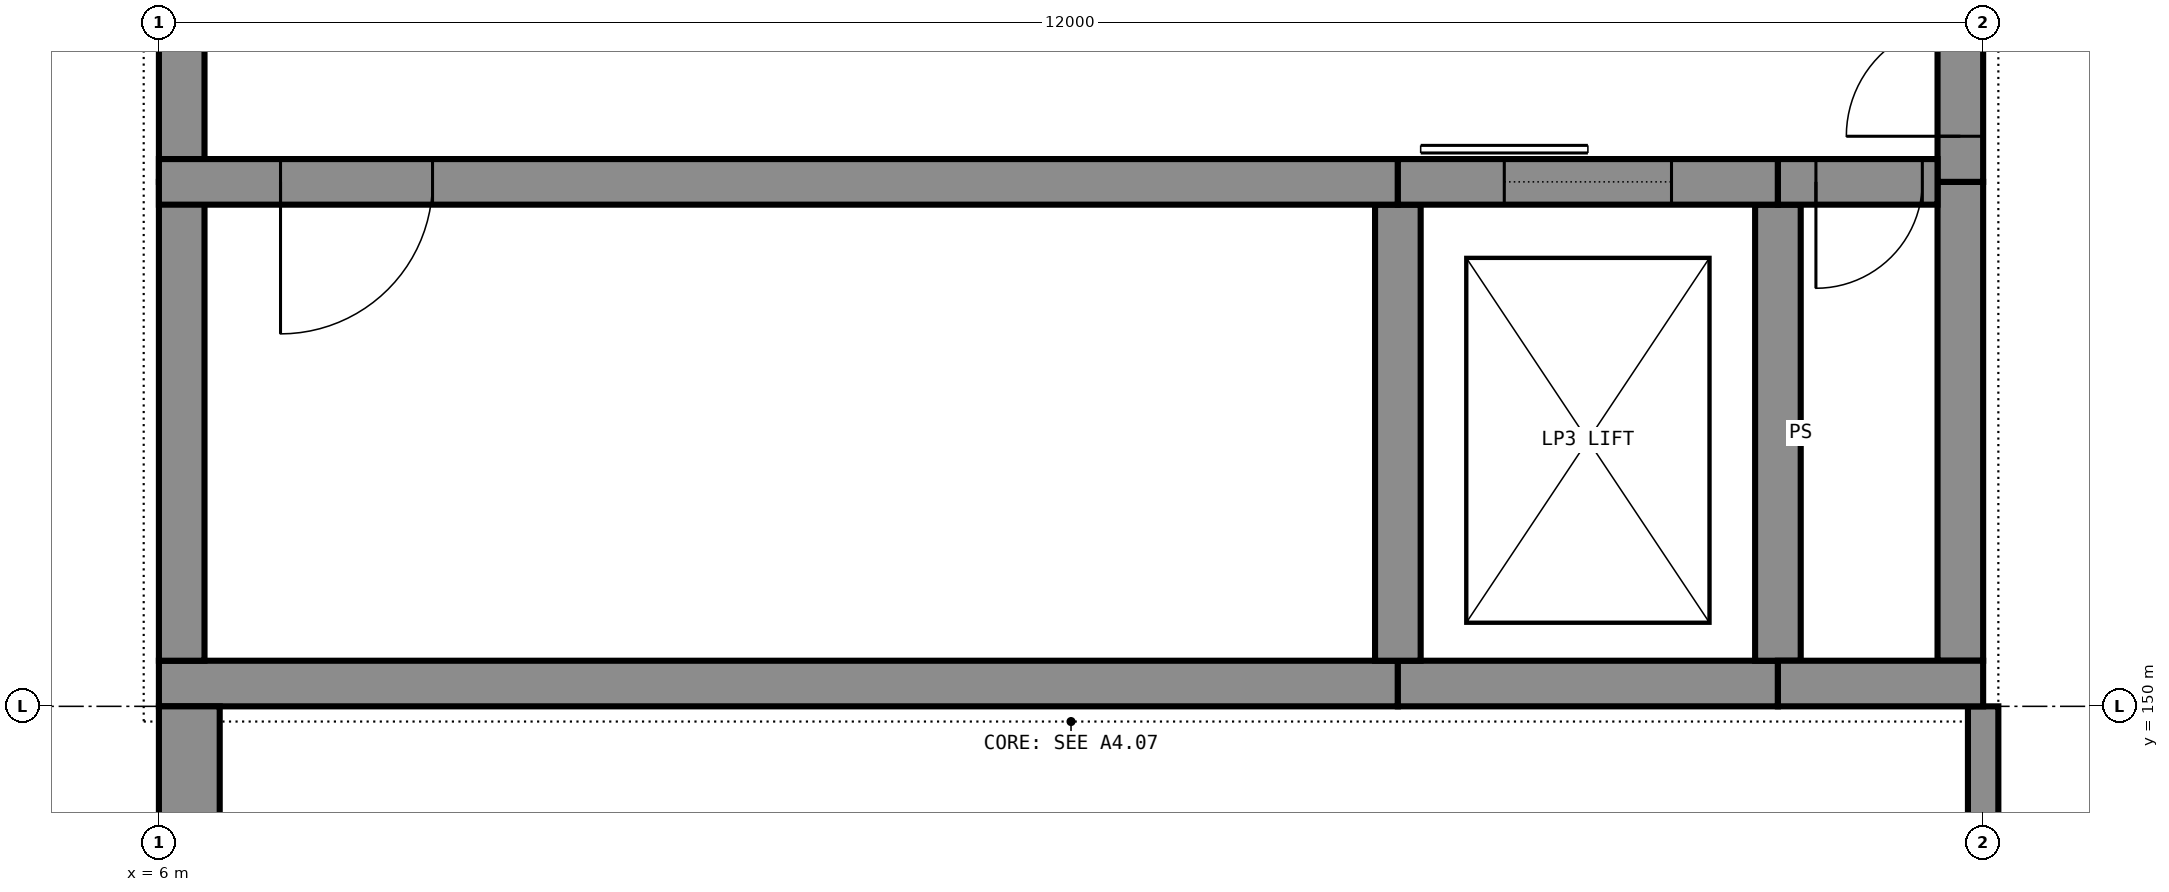
"""IFC4 building model, lengths in metres.
Left out: names, types, materials, properties, quantities, classifications, styles, units other than length and angle.
Written with IfcOpenShell. Run it as: python <this file> out.ifc"""

import sys

from ifc_helpers import new_model, si_unit, direction, frame, frame_2d, origin, place, context, subcontext, project, spatial, rectangle, extrude, element, fill, save


model = new_model("IFC4")
c1 = context("Model", 3, precision=1e-05, world=origin(), true_north=direction((0.0, 1.0)))
c2 = subcontext(c1, "Body", "Model", "MODEL_VIEW")
j1 = project(units=[si_unit("LENGTHUNIT", "METRE"), si_unit("PLANEANGLEUNIT", "RADIAN")], contexts=[c1])
p1 = place(None, origin())
s1 = spatial("IfcSite", under=j1, at=p1, CompositionType="ELEMENT")
p2 = place(p1, origin())
s2 = spatial("IfcBuilding", under=s1, at=p2, CompositionType="ELEMENT")
p3 = place(p2, frame((0.0, 0.0, -6.0)))
s3 = spatial("IfcBuildingStorey", under=s2, at=p3, CompositionType="ELEMENT", Elevation=-6.0)
p4 = place(p3, frame((6.0, 150.15, 0.0), z_axis=(0.0, 0.0, 1.0), x_axis=(1.0, 0.0, 0.0)))
e1 = element("IfcWall", 1, at=p4, inside=s3, PredefinedType="SHEAR", context=c2, shape_type="SweptSolid", body=[
    extrude(rectangle(XDim=8.15, YDim=0.3, at=frame_2d((4.075, 0.0))), origin(), (0.0, 0.0, 1.0), 5.7),
])
p5 = place(p3, frame((14.15, 150.15, 0.0), z_axis=(0.0, 0.0, 1.0), x_axis=(1.0, 0.0, 0.0)))
e2 = element("IfcWall", 2, at=p5, inside=s3, PredefinedType="SHEAR", context=c2, shape_type="SweptSolid", body=[
    extrude(rectangle(XDim=2.5, YDim=0.3, at=frame_2d((1.25, 0.0))), origin(), (0.0, 0.0, 1.0), 5.7),
])
p6 = place(p3, frame((16.65, 150.15, 0.0), z_axis=(0.0, 0.0, 1.0), x_axis=(1.0, 0.0, 0.0)))
e3 = element("IfcWall", 3, at=p6, inside=s3, PredefinedType="SHEAR", context=c2, shape_type="SweptSolid", body=[
    extrude(rectangle(XDim=1.35, YDim=0.3, at=frame_2d((0.675, 0.0))), origin(), (0.0, 0.0, 1.0), 5.7),
])
p7 = place(p3, frame((6.0, 153.45, 0.0), z_axis=(0.0, 0.0, 1.0), x_axis=(1.0, 0.0, 0.0)))
e4 = element("IfcWall", 4, at=p7, inside=s3, PredefinedType="SHEAR", context=c2, shape_type="SweptSolid", body=[
    extrude(rectangle(XDim=8.15, YDim=0.3, at=frame_2d((4.075, 0.0))), origin(), (0.0, 0.0, 1.0), 5.7),
])
p8 = place(p7, frame((0.8, 0.0, 0.0)))
e5 = element("IfcOpeningElement", 5, at=p8, cuts=e4, PredefinedType="OPENING", context=c2, shape_type="SweptSolid", body=[
    extrude(rectangle(XDim=1.0, YDim=2.1, at=frame_2d((0.5, 1.05))), frame((0.0, 0.16, 0.0), z_axis=(0.0, -1.0, 0.0), x_axis=(1.0, 0.0, 0.0)), (0.0, 0.0, 1.0), 0.32),
])
p9 = place(p3, frame((14.15, 153.45, 0.0), z_axis=(0.0, 0.0, 1.0), x_axis=(1.0, 0.0, 0.0)))
e6 = element("IfcWall", 6, at=p9, inside=s3, PredefinedType="SHEAR", context=c2, shape_type="SweptSolid", body=[
    extrude(rectangle(XDim=2.5, YDim=0.3, at=frame_2d((1.25, 0.0))), origin(), (0.0, 0.0, 1.0), 5.7),
])
p10 = place(p9, frame((0.7, 0.0, 0.0)))
e7 = element("IfcOpeningElement", 7, at=p10, cuts=e6, PredefinedType="OPENING", context=c2, shape_type="SweptSolid", body=[
    extrude(rectangle(XDim=1.1, YDim=2.1, at=frame_2d((0.55, 1.05))), frame((0.0, 0.16, 0.0), z_axis=(0.0, -1.0, 0.0), x_axis=(1.0, 0.0, 0.0)), (0.0, 0.0, 1.0), 0.32),
])
p11 = place(p3, frame((16.65, 153.45, 0.0), z_axis=(0.0, 0.0, 1.0), x_axis=(1.0, 0.0, 0.0)))
e8 = element("IfcWall", 8, at=p11, inside=s3, PredefinedType="SHEAR", context=c2, shape_type="SweptSolid", body=[
    extrude(rectangle(XDim=1.05, YDim=0.3, at=frame_2d((0.525, 0.0))), origin(), (0.0, 0.0, 1.0), 5.7),
])
p12 = place(p11, frame((0.25, 0.0, 0.0)))
e9 = element("IfcOpeningElement", 9, at=p12, cuts=e8, PredefinedType="OPENING", context=c2, shape_type="SweptSolid", body=[
    extrude(rectangle(XDim=0.7, YDim=2.1, at=frame_2d((0.35, 1.05))), frame((0.0, 0.16, 0.0), z_axis=(0.0, -1.0, 0.0), x_axis=(1.0, 0.0, 0.0)), (0.0, 0.0, 1.0), 0.32),
])
p13 = place(p3, frame((6.15, 150.3, 0.0), z_axis=(0.0, 0.0, 1.0), x_axis=(0.0, 1.0, 0.0)))
e10 = element("IfcWall", 10, at=p13, inside=s3, PredefinedType="SHEAR", context=c2, shape_type="SweptSolid", body=[
    extrude(rectangle(XDim=3.15, YDim=0.3, at=frame_2d((1.575, 0.0))), origin(), (0.0, 0.0, 1.0), 5.7),
])
p14 = place(p3, frame((6.15, 153.45, 0.0), z_axis=(0.0, 0.0, 1.0), x_axis=(0.0, 1.0, 0.0)))
e11 = element("IfcWall", 11, at=p14, inside=s3, PredefinedType="SHEAR", context=c2, shape_type="SweptSolid", body=[
    extrude(rectangle(XDim=5.1, YDim=0.3, at=frame_2d((2.55, 0.0))), origin(), (0.0, 0.0, 1.0), 5.7),
])
p15 = place(p3, frame((17.85, 150.3, 0.0), z_axis=(0.0, 0.0, 1.0), x_axis=(0.0, 1.0, 0.0)))
e12 = element("IfcWall", 12, at=p15, inside=s3, PredefinedType="SHEAR", context=c2, shape_type="SweptSolid", body=[
    extrude(rectangle(XDim=3.15, YDim=0.3, at=frame_2d((1.575, 0.0))), origin(), (0.0, 0.0, 1.0), 5.7),
])
p16 = place(p3, frame((17.85, 153.45, 0.0), z_axis=(0.0, 0.0, 1.0), x_axis=(0.0, 1.0, 0.0)))
e13 = element("IfcWall", 13, at=p16, inside=s3, PredefinedType="SHEAR", context=c2, shape_type="SweptSolid", body=[
    extrude(rectangle(XDim=5.1, YDim=0.3, at=frame_2d((2.55, 0.0))), origin(), (0.0, 0.0, 1.0), 5.7),
])
p17 = place(p16, frame((0.3, 0.0, 0.0)))
e14 = element("IfcOpeningElement", 14, at=p17, cuts=e13, PredefinedType="OPENING", context=c2, shape_type="SweptSolid", body=[
    extrude(rectangle(XDim=1.5, YDim=2.1, at=frame_2d((0.75, 1.05))), frame((0.0, 0.16, 0.0), z_axis=(0.0, -1.0, 0.0), x_axis=(1.0, 0.0, 0.0)), (0.0, 0.0, 1.0), 0.32),
])
for number, where, z_axis, x_axis in (
    (15, (14.15, 150.3, 0.0), (0.0, 0.0, 1.0), (0.0, 1.0, 0.0)),
    (16, (16.65, 150.3, 0.0), (0.0, 0.0, 1.0), (0.0, 1.0, 0.0)),
):
    element("IfcWall", number, at=place(p3, frame(where, z_axis=z_axis, x_axis=x_axis)), inside=s3, PredefinedType="SHEAR", context=c2, shape_type="SweptSolid", body=[
        extrude(rectangle(XDim=3.0, YDim=0.3, at=frame_2d((1.5, 0.0))), origin(), (0.0, 0.0, 1.0), 5.7),
    ])
p18 = place(p3, frame((6.2, 138.5, 0.0), z_axis=(0.0, 0.0, 1.0), x_axis=(0.0, 1.0, 0.0)))
e17 = element("IfcWall", 17, at=p18, inside=s3, PredefinedType="SOLIDWALL", context=c2, shape_type="SweptSolid", body=[
    extrude(rectangle(XDim=11.5, YDim=0.4, at=frame_2d((5.75, 0.0))), origin(), (0.0, 0.0, 1.0), 5.7),
])
p19 = place(p3, frame((18.0, 108.1, 0.0), z_axis=(0.0, 0.0, 1.0), x_axis=(0.0, 1.0, 0.0)))
e18 = element("IfcWall", 18, at=p19, inside=s3, PredefinedType="PARTITIONING", context=c2, shape_type="SweptSolid", body=[
    extrude(rectangle(XDim=41.9, YDim=0.2, at=frame_2d((20.95, 0.0))), origin(), (0.0, 0.0, 1.0), 4.7),
])
p20 = place(p19, frame((2.3, 0.0, 0.0)))
e19 = element("IfcOpeningElement", 19, at=p20, cuts=e18, PredefinedType="OPENING", context=c2, shape_type="SweptSolid", body=[
    extrude(rectangle(XDim=1.2, YDim=2.1, at=frame_2d((0.6, 1.05))), frame((0.0, 0.11, 0.0), z_axis=(0.0, -1.0, 0.0), x_axis=(1.0, 0.0, 0.0)), (0.0, 0.0, 1.0), 0.22),
])
p21 = place(p19, frame((14.3, 0.0, 0.0)))
e20 = element("IfcOpeningElement", 20, at=p21, cuts=e18, PredefinedType="OPENING", context=c2, shape_type="SweptSolid", body=[
    extrude(rectangle(XDim=1.2, YDim=2.1, at=frame_2d((0.6, 1.05))), frame((0.0, 0.11, 0.0), z_axis=(0.0, -1.0, 0.0), x_axis=(1.0, 0.0, 0.0)), (0.0, 0.0, 1.0), 0.22),
])
p22 = place(p19, frame((32.3, 0.0, 0.0)))
e21 = element("IfcOpeningElement", 21, at=p22, cuts=e18, PredefinedType="OPENING", context=c2, shape_type="SweptSolid", body=[
    extrude(rectangle(XDim=1.2, YDim=2.1, at=frame_2d((0.6, 1.05))), frame((0.0, 0.11, 0.0), z_axis=(0.0, -1.0, 0.0), x_axis=(1.0, 0.0, 0.0)), (0.0, 0.0, 1.0), 0.22),
])
p23 = place(p8, frame((1.0, 0.0, 0.0), z_axis=(0.0, 0.0, 1.0), x_axis=(-1.0, 0.0, 0.0)))
e22 = element("IfcDoor", 22, at=p23, inside=s3, OperationType="SINGLE_SWING_LEFT", PredefinedType="DOOR", context=c2, shape_type="SweptSolid", body=[
    extrude(rectangle(XDim=1.0, YDim=2.1, at=frame_2d((0.5, 1.05))), frame((0.0, 0.025, 0.0), z_axis=(0.0, -1.0, 0.0), x_axis=(1.0, 0.0, 0.0)), (0.0, 0.0, 1.0), 0.05),
])
fill(e5, e22)
p24 = place(p10, origin())
e23 = element("IfcDoor", 23, at=p24, inside=s3, OperationType="SLIDING_TO_LEFT", PredefinedType="DOOR", context=c2, shape_type="SweptSolid", body=[
    extrude(rectangle(XDim=1.1, YDim=2.1, at=frame_2d((0.55, 1.05))), frame((0.0, 0.025, 0.0), z_axis=(0.0, -1.0, 0.0), x_axis=(1.0, 0.0, 0.0)), (0.0, 0.0, 1.0), 0.05),
])
fill(e7, e23)
p25 = place(p12, frame((0.7, 0.0, 0.0), z_axis=(0.0, 0.0, 1.0), x_axis=(-1.0, 0.0, 0.0)))
e24 = element("IfcDoor", 24, at=p25, inside=s3, OperationType="SINGLE_SWING_LEFT", PredefinedType="DOOR", context=c2, shape_type="SweptSolid", body=[
    extrude(rectangle(XDim=0.7, YDim=2.1, at=frame_2d((0.35, 1.05))), frame((0.0, 0.025, 0.0), z_axis=(0.0, -1.0, 0.0), x_axis=(1.0, 0.0, 0.0)), (0.0, 0.0, 1.0), 0.05),
])
fill(e9, e24)
p26 = place(p17, origin())
e25 = element("IfcDoor", 25, at=p26, inside=s3, OperationType="DOUBLE_DOOR_SINGLE_SWING", PredefinedType="DOOR", context=c2, shape_type="SweptSolid", body=[
    extrude(rectangle(XDim=1.5, YDim=2.1, at=frame_2d((0.75, 1.05))), frame((0.0, 0.025, 0.0), z_axis=(0.0, -1.0, 0.0), x_axis=(1.0, 0.0, 0.0)), (0.0, 0.0, 1.0), 0.05),
])
fill(e14, e25)
save(model, sys.argv[1])
